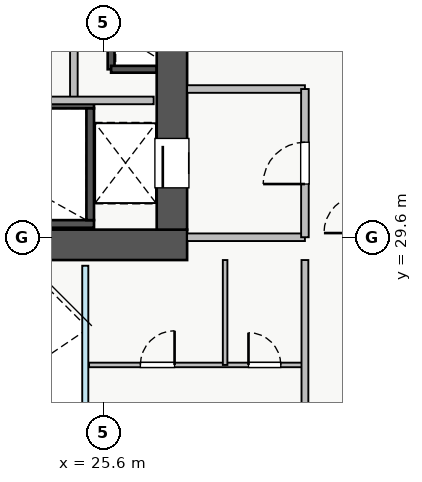
"""IFC4 building model, lengths in metres.
Left out: names, types, materials, properties, quantities, classifications, styles, units other than length and angle.
Written with IfcOpenShell. Run it as: python <this file> out.ifc"""

import sys

from ifc_helpers import new_model, si_unit, direction, frame, frame_2d, origin, place, context, subcontext, project, spatial, rectangle, extrude, source, transform, mapped, element, fill, save


model = new_model("IFC4")
c1 = context("Model", 3, precision=1e-05, world=origin(), true_north=direction((0.0, 1.0)))
c2 = subcontext(c1, "Body", "Model", "MODEL_VIEW")
j1 = project(units=[si_unit("LENGTHUNIT", "METRE"), si_unit("PLANEANGLEUNIT", "RADIAN")], contexts=[c1])
p1 = place(None, origin())
s1 = spatial("IfcSite", under=j1, at=p1, CompositionType="ELEMENT")
p2 = place(p1, origin())
s2 = spatial("IfcBuilding", under=s1, at=p2, CompositionType="ELEMENT")
p3 = place(p2, frame((0.0, 0.0, 56.75)))
s3 = spatial("IfcBuildingStorey", under=s2, at=p3, CompositionType="ELEMENT", Elevation=56.75)
p4 = place(p3, frame((25.8, 34.02, 0.0), z_axis=(0.0, 0.0, 1.0), x_axis=(0.0, 1.0, 0.0)))
e1 = element("IfcWall", 1, at=p4, inside=s3, PredefinedType="SHEAR", context=c2, shape_type="SweptSolid", body=[
    extrude(rectangle(XDim=1.06, YDim=0.18, at=frame_2d((0.53, 0.0))), origin(), (0.0, 0.0, 1.0), 3.07),
])
p5 = place(p3, frame((25.8, 34.02, 0.0), z_axis=(0.0, 0.0, 1.0), x_axis=(1.0, 0.0, 0.0)))
e2 = element("IfcWall", 2, at=p5, inside=s3, PredefinedType="SHEAR", context=c2, shape_type="SweptSolid", body=[
    extrude(rectangle(XDim=1.2, YDim=0.18, at=frame_2d((0.6, 0.0))), origin(), (0.0, 0.0, 1.0), 3.07),
])
p6 = place(p3, frame((18.2, 29.95, 0.0), z_axis=(0.0, 0.0, 1.0), x_axis=(1.0, 0.0, 0.0)))
e3 = element("IfcWall", 3, at=p6, inside=s3, PredefinedType="SHEAR", context=c2, shape_type="SweptSolid", body=[
    extrude(rectangle(XDim=7.15, YDim=0.2, at=frame_2d((3.575, 0.0))), origin(), (0.0, 0.0, 1.0), 3.25),
])
p7 = place(p3, frame((18.2, 33.09, 0.0), z_axis=(0.0, 0.0, 1.0), x_axis=(1.0, 0.0, 0.0)))
e4 = element("IfcWall", 4, at=p7, inside=s3, PredefinedType="SHEAR", context=c2, shape_type="SweptSolid", body=[
    extrude(rectangle(XDim=7.15, YDim=0.2, at=frame_2d((3.575, 0.0))), origin(), (0.0, 0.0, 1.0), 3.25),
])
p8 = place(p7, frame((0.35, 0.0, 0.0)))
e5 = element("IfcOpeningElement", 5, at=p8, cuts=e4, PredefinedType="OPENING", context=c2, shape_type="SweptSolid", body=[
    extrude(rectangle(XDim=1.1, YDim=2.05, at=frame_2d((0.55, 1.025))), frame((0.0, 0.11, 0.0), z_axis=(0.0, -1.0, 0.0), x_axis=(1.0, 0.0, 0.0)), (0.0, 0.0, 1.0), 0.22),
])
p9 = place(p3, frame((25.25, 30.05, 0.0), z_axis=(0.0, 0.0, 1.0), x_axis=(0.0, 1.0, 0.0)))
e6 = element("IfcWall", 6, at=p9, inside=s3, PredefinedType="SHEAR", context=c2, shape_type="SweptSolid", body=[
    extrude(rectangle(XDim=2.94, YDim=0.2, at=frame_2d((1.47, 0.0))), origin(), (0.0, 0.0, 1.0), 3.25),
])
p10 = place(p3, frame((10.2, 29.4, 0.0), z_axis=(0.0, 0.0, 1.0), x_axis=(1.0, 0.0, 0.0)))
e7 = element("IfcWall", 7, at=p10, inside=s3, PredefinedType="SHEAR", context=c2, shape_type="SweptSolid", body=[
    extrude(rectangle(XDim=17.6, YDim=0.8, at=frame_2d((8.8, 0.0))), origin(), (0.0, 0.0, 1.0), 3.25),
])
p11 = place(p3, frame((27.4, 29.8, 0.0), z_axis=(0.0, 0.0, 1.0), x_axis=(0.0, 1.0, 0.0)))
e8 = element("IfcWall", 8, at=p11, inside=s3, PredefinedType="SHEAR", context=c2, shape_type="SweptSolid", body=[
    extrude(rectangle(XDim=5.6, YDim=0.8, at=frame_2d((2.8, 0.0))), origin(), (0.0, 0.0, 1.0), 3.25),
])
p12 = place(p11, frame((1.1, 0.0, 0.0)))
e9 = element("IfcOpeningElement", 9, at=p12, cuts=e8, PredefinedType="OPENING", context=c2, shape_type="SweptSolid", body=[
    extrude(rectangle(XDim=1.3, YDim=2.05, at=frame_2d((0.65, 1.025))), frame((0.0, 0.41, 0.0), z_axis=(0.0, -1.0, 0.0), x_axis=(1.0, 0.0, 0.0)), (0.0, 0.0, 1.0), 0.82),
])
for number, where, z_axis, x_axis in (
    (10, (27.8, 29.6, 0.0), (0.0, 0.0, 1.0), (1.0, 0.0, 0.0)),
    (11, (27.8, 33.5, 0.0), (0.0, 0.0, 1.0), (1.0, 0.0, 0.0)),
):
    element("IfcWall", number, at=place(p3, frame(where, z_axis=z_axis, x_axis=x_axis)), inside=s3, PredefinedType="PARTITIONING", context=c2, shape_type="SweptSolid", body=[
        extrude(rectangle(XDim=3.1, YDim=0.2, at=frame_2d((1.55, 0.0))), origin(), (0.0, 0.0, 1.0), 3.07),
    ])
p13 = place(p3, frame((30.9, 29.6, 0.0), z_axis=(0.0, 0.0, 1.0), x_axis=(0.0, 1.0, 0.0)))
e12 = element("IfcWall", 12, at=p13, inside=s3, PredefinedType="PARTITIONING", context=c2, shape_type="SweptSolid", body=[
    extrude(rectangle(XDim=3.9, YDim=0.2, at=frame_2d((1.95, 0.0))), origin(), (0.0, 0.0, 1.0), 3.07),
])
p14 = place(p13, frame((1.4, 0.0, 0.0)))
e13 = element("IfcOpeningElement", 13, at=p14, cuts=e12, PredefinedType="OPENING", context=c2, shape_type="SweptSolid", body=[
    extrude(rectangle(XDim=1.1, YDim=2.05, at=frame_2d((0.55, 1.025))), frame((0.0, 0.11, 0.0), z_axis=(0.0, -1.0, 0.0), x_axis=(1.0, 0.0, 0.0)), (0.0, 0.0, 1.0), 0.22),
])
p15 = place(p3, frame((24.82, 33.2, 0.0), z_axis=(0.0, 0.0, 1.0), x_axis=(0.0, 1.0, 0.0)))
e14 = element("IfcWall", 14, at=p15, inside=s3, PredefinedType="PARTITIONING", context=c2, shape_type="SweptSolid", body=[
    extrude(rectangle(XDim=2.65, YDim=0.2, at=frame_2d((1.325, 0.0))), origin(), (0.0, 0.0, 1.0), 3.07),
])
p16 = place(p3, frame((21.75, 33.2, 0.0), z_axis=(0.0, 0.0, 1.0), x_axis=(1.0, 0.0, 0.0)))
e15 = element("IfcWall", 15, at=p16, inside=s3, PredefinedType="PARTITIONING", context=c2, shape_type="SweptSolid", body=[
    extrude(rectangle(XDim=5.17, YDim=0.2, at=frame_2d((2.585, 0.0))), origin(), (0.0, 0.0, 1.0), 3.07),
])
p17 = place(p3, frame((25.22, 26.24, 0.0), z_axis=(0.0, 0.0, 1.0), x_axis=(1.0, 0.0, 0.0)))
e16 = element("IfcWall", 16, at=p17, inside=s3, PredefinedType="PLUMBINGWALL", context=c2, shape_type="SweptSolid", body=[
    extrude(rectangle(XDim=5.68, YDim=0.12, at=frame_2d((2.84, 0.0))), origin(), (0.0, 0.0, 1.0), 2.625),
])
p18 = place(p17, frame((1.35, 0.0, 0.0)))
e17 = element("IfcOpeningElement", 17, at=p18, cuts=e16, PredefinedType="OPENING", context=c2, shape_type="SweptSolid", body=[
    extrude(rectangle(XDim=0.9, YDim=2.05, at=frame_2d((0.45, 1.025))), frame((0.0, 0.07, 0.0), z_axis=(0.0, -1.0, 0.0), x_axis=(1.0, 0.0, 0.0)), (0.0, 0.0, 1.0), 0.14),
])
p19 = place(p17, frame((4.195, 0.0, 0.0)))
e18 = element("IfcOpeningElement", 18, at=p19, cuts=e16, PredefinedType="OPENING", context=c2, shape_type="SweptSolid", body=[
    extrude(rectangle(XDim=0.85, YDim=2.05, at=frame_2d((0.425, 1.025))), frame((0.0, 0.07, 0.0), z_axis=(0.0, -1.0, 0.0), x_axis=(1.0, 0.0, 0.0)), (0.0, 0.0, 1.0), 0.14),
])
p20 = place(p3, frame((28.8, 26.24, 0.0), z_axis=(0.0, 0.0, 1.0), x_axis=(0.0, 1.0, 0.0)))
e19 = element("IfcWall", 19, at=p20, inside=s3, PredefinedType="PLUMBINGWALL", context=c2, shape_type="SweptSolid", body=[
    extrude(rectangle(XDim=2.76, YDim=0.12, at=frame_2d((1.38, 0.0))), origin(), (0.0, 0.0, 1.0), 3.07),
])
p21 = place(p3, frame((30.9, 17.0, 0.0), z_axis=(0.0, 0.0, 1.0), x_axis=(0.0, 1.0, 0.0)))
e20 = element("IfcWall", 20, at=p21, inside=s3, PredefinedType="PARTITIONING", context=c2, shape_type="SweptSolid", body=[
    extrude(rectangle(XDim=12.0, YDim=0.18, at=frame_2d((6.0, 0.0))), origin(), (0.0, 0.0, 1.0), 3.07),
])
p22 = place(p21, frame((0.93, 0.0, 0.0)))
e21 = element("IfcOpeningElement", 21, at=p22, cuts=e20, PredefinedType="OPENING", context=c2, shape_type="SweptSolid", body=[
    extrude(rectangle(XDim=1.0, YDim=2.05, at=frame_2d((0.5, 1.025))), frame((0.0, 0.1, 0.0), z_axis=(0.0, -1.0, 0.0), x_axis=(1.0, 0.0, 0.0)), (0.0, 0.0, 1.0), 0.2),
])
p23 = place(p21, frame((6.93, 0.0, 0.0)))
e22 = element("IfcOpeningElement", 22, at=p23, cuts=e20, PredefinedType="OPENING", context=c2, shape_type="SweptSolid", body=[
    extrude(rectangle(XDim=1.0, YDim=2.05, at=frame_2d((0.5, 1.025))), frame((0.0, 0.1, 0.0), z_axis=(0.0, -1.0, 0.0), x_axis=(1.0, 0.0, 0.0)), (0.0, 0.0, 1.0), 0.2),
])
m1 = source(origin(), c2, "Body", "SweptSolid", [
    extrude(rectangle(XDim=1.3, YDim=2.05, at=frame_2d((0.65, 1.025))), frame((0.0, 0.025, 0.0), z_axis=(0.0, -1.0, 0.0), x_axis=(1.0, 0.0, 0.0)), (0.0, 0.0, 1.0), 0.05),
])
p24 = place(p12, origin())
e23 = element("IfcDoor", 23, at=p24, inside=s3, OperationType="SLIDING_TO_LEFT", PredefinedType="DOOR", context=c2, shape_type="MappedRepresentation", body=[
    mapped(m1, transform((0.0, 0.0, 0.0), x_axis=(1.0, 0.0, 0.0), y_axis=(0.0, 1.0, 0.0), z_axis=(0.0, 0.0, 1.0), scale=1.0)),
])
fill(e9, e23)
m2 = source(origin(), c2, "Body", "SweptSolid", [
    extrude(rectangle(XDim=1.1, YDim=2.05, at=frame_2d((0.55, 1.025))), frame((0.0, 0.025, 0.0), z_axis=(0.0, -1.0, 0.0), x_axis=(1.0, 0.0, 0.0)), (0.0, 0.0, 1.0), 0.05),
])
p25 = place(p14, origin())
e24 = element("IfcDoor", 24, at=p25, inside=s3, OperationType="SINGLE_SWING_LEFT", PredefinedType="DOOR", context=c2, shape_type="MappedRepresentation", body=[
    mapped(m2, transform((0.0, 0.0, 0.0), x_axis=(1.0, 0.0, 0.0), y_axis=(0.0, 1.0, 0.0), z_axis=(0.0, 0.0, 1.0), scale=1.0)),
])
fill(e13, e24)
m3 = source(origin(), c2, "Body", "SweptSolid", [
    extrude(rectangle(XDim=0.9, YDim=2.05, at=frame_2d((0.45, 1.025))), frame((0.0, 0.025, 0.0), z_axis=(0.0, -1.0, 0.0), x_axis=(1.0, 0.0, 0.0)), (0.0, 0.0, 1.0), 0.05),
])
p26 = place(p18, origin())
e25 = element("IfcDoor", 25, at=p26, inside=s3, OperationType="SINGLE_SWING_RIGHT", PredefinedType="DOOR", context=c2, shape_type="MappedRepresentation", body=[
    mapped(m3, transform((0.0, 0.0, 0.0), x_axis=(1.0, 0.0, 0.0), y_axis=(0.0, 1.0, 0.0), z_axis=(0.0, 0.0, 1.0), scale=1.0)),
])
fill(e17, e25)
m4 = source(origin(), c2, "Body", "SweptSolid", [
    extrude(rectangle(XDim=0.85, YDim=2.05, at=frame_2d((0.425, 1.025))), frame((0.0, 0.025, 0.0), z_axis=(0.0, -1.0, 0.0), x_axis=(1.0, 0.0, 0.0)), (0.0, 0.0, 1.0), 0.05),
])
p27 = place(p19, origin())
e26 = element("IfcDoor", 26, at=p27, inside=s3, OperationType="SINGLE_SWING_LEFT", PredefinedType="DOOR", context=c2, shape_type="MappedRepresentation", body=[
    mapped(m4, transform((0.0, 0.0, 0.0), x_axis=(1.0, 0.0, 0.0), y_axis=(0.0, 1.0, 0.0), z_axis=(0.0, 0.0, 1.0), scale=1.0)),
])
fill(e18, e26)
save(model, sys.argv[1])
